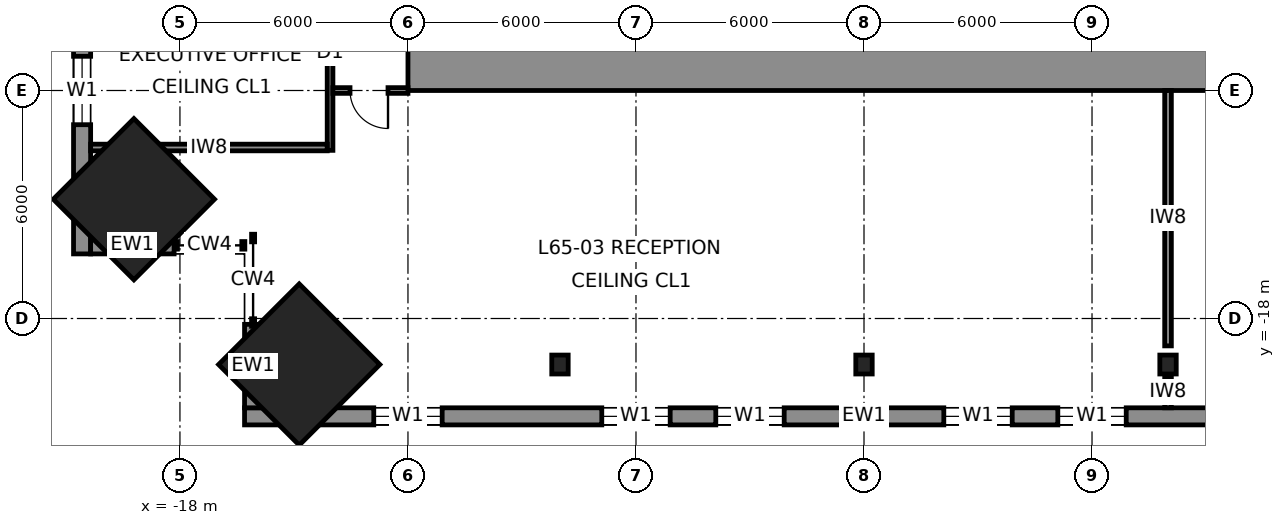
"""IFC4 building model, lengths in metres.
Left out: names, types, materials, properties, quantities, classifications, styles, units other than length and angle.
Written with IfcOpenShell. Run it as: python <this file> out.ifc"""

import sys

from ifc_helpers import new_model, si_unit, direction, frame, frame_2d, origin, origin_2d, place, context, subcontext, project, spatial, rectangle, i_section, extrude, element, fill, save


model = new_model("IFC4")
c1 = context("Model", 3, precision=1e-05, world=origin(), true_north=direction((0.0, 1.0)))
c2 = subcontext(c1, "Body", "Model", "MODEL_VIEW")
j1 = project(units=[si_unit("LENGTHUNIT", "METRE"), si_unit("PLANEANGLEUNIT", "RADIAN")], contexts=[c1])
p1 = place(None, origin())
s1 = spatial("IfcSite", under=j1, at=p1, CompositionType="ELEMENT")
p2 = place(p1, origin())
s2 = spatial("IfcBuilding", under=s1, at=p2, CompositionType="ELEMENT")
p3 = place(p2, frame((0.0, 0.0, 289.8)))
s3 = spatial("IfcBuildingStorey", under=s2, at=p3, CompositionType="ELEMENT", Elevation=289.8)
for number, where, z_axis, x_axis in (
    (1, (-14.861, -19.211, 0.0), (0.04, 0.04, 0.998), (-0.707, 0.708, 0.0)),
    (2, (-19.211, -14.861, 0.0), (0.04, 0.04, 0.998), (-0.708, 0.707, 0.0)),
):
    element("IfcColumn", number, at=place(p3, frame(where, z_axis=z_axis, x_axis=x_axis)), inside=s3, PredefinedType="COLUMN", context=c2, shape_type="SweptSolid", body=[
        extrude(rectangle(XDim=3.0, YDim=3.0, at=origin_2d()), origin(), (0.0, 0.0, 1.0), 4.007),
    ])
for number, where, z_axis, x_axis in (
    (3, (0.0, -19.211, 0.0), (0.0, 0.04, 0.999), (-1.0, 0.0, 0.0)),
    (4, (-8.0, -19.211, 0.0), (0.0, 0.04, 0.999), (-1.0, 0.0, 0.0)),
    (5, (8.0, -19.211, 0.0), (0.0, 0.04, 0.999), (-1.0, 0.0, 0.0)),
):
    element("IfcColumn", number, at=place(p3, frame(where, z_axis=z_axis, x_axis=x_axis)), inside=s3, PredefinedType="COLUMN", context=c2, shape_type="SweptSolid", body=[
        extrude(i_section(OverallWidth=0.432, OverallDepth=0.498, WebThickness=0.056, FlangeThickness=0.089, at=origin_2d()), origin(), (0.0, 0.0, 1.0), 4.003),
    ])
p4 = place(p3, frame((12.0, -11.25, 0.0), z_axis=(0.0, 0.0, 1.0), x_axis=(-1.0, 0.0, 0.0)))
e6 = element("IfcWall", 6, at=p4, inside=s3, PredefinedType="SHEAR", context=c2, shape_type="SweptSolid", body=[
    extrude(rectangle(XDim=24.0, YDim=1.5, at=frame_2d((12.0, 0.0))), origin(), (0.0, 0.0, 1.0), 4.0),
])
p5 = place(p3, frame((-16.3, -20.575, 0.0), z_axis=(0.0, 0.0, 1.0), x_axis=(1.0, 0.0, 0.0)))
e7 = element("IfcWall", 7, at=p5, inside=s3, PredefinedType="SOLIDWALL", context=c2, shape_type="SweptSolid", body=[
    extrude(rectangle(XDim=32.6, YDim=0.45, at=frame_2d((16.3, 0.0))), origin(), (0.0, 0.0, 1.0), 3.83),
])
p6 = place(p5, frame((3.4, 0.0, 0.7)))
e8 = element("IfcOpeningElement", 8, at=p6, cuts=e7, PredefinedType="OPENING", context=c2, shape_type="SweptSolid", body=[
    extrude(rectangle(XDim=1.8, YDim=2.6, at=frame_2d((0.9, 1.3))), frame((0.0, 0.235, 0.0), z_axis=(0.0, -1.0, 0.0), x_axis=(1.0, 0.0, 0.0)), (0.0, 0.0, 1.0), 0.47),
])
p7 = place(p5, frame((9.4, 0.0, 0.7)))
e9 = element("IfcOpeningElement", 9, at=p7, cuts=e7, PredefinedType="OPENING", context=c2, shape_type="SweptSolid", body=[
    extrude(rectangle(XDim=1.8, YDim=2.6, at=frame_2d((0.9, 1.3))), frame((0.0, 0.235, 0.0), z_axis=(0.0, -1.0, 0.0), x_axis=(1.0, 0.0, 0.0)), (0.0, 0.0, 1.0), 0.47),
])
p8 = place(p5, frame((12.4, 0.0, 0.7)))
e10 = element("IfcOpeningElement", 10, at=p8, cuts=e7, PredefinedType="OPENING", context=c2, shape_type="SweptSolid", body=[
    extrude(rectangle(XDim=1.8, YDim=2.6, at=frame_2d((0.9, 1.3))), frame((0.0, 0.235, 0.0), z_axis=(0.0, -1.0, 0.0), x_axis=(1.0, 0.0, 0.0)), (0.0, 0.0, 1.0), 0.47),
])
p9 = place(p5, frame((18.4, 0.0, 0.7)))
e11 = element("IfcOpeningElement", 11, at=p9, cuts=e7, PredefinedType="OPENING", context=c2, shape_type="SweptSolid", body=[
    extrude(rectangle(XDim=1.8, YDim=2.6, at=frame_2d((0.9, 1.3))), frame((0.0, 0.235, 0.0), z_axis=(0.0, -1.0, 0.0), x_axis=(1.0, 0.0, 0.0)), (0.0, 0.0, 1.0), 0.47),
])
p10 = place(p5, frame((21.4, 0.0, 0.7)))
e12 = element("IfcOpeningElement", 12, at=p10, cuts=e7, PredefinedType="OPENING", context=c2, shape_type="SweptSolid", body=[
    extrude(rectangle(XDim=1.8, YDim=2.6, at=frame_2d((0.9, 1.3))), frame((0.0, 0.235, 0.0), z_axis=(0.0, -1.0, 0.0), x_axis=(1.0, 0.0, 0.0)), (0.0, 0.0, 1.0), 0.47),
])
p11 = place(p5, frame((27.4, 0.0, 0.7)))
e13 = element("IfcOpeningElement", 13, at=p11, cuts=e7, PredefinedType="OPENING", context=c2, shape_type="SweptSolid", body=[
    extrude(rectangle(XDim=1.8, YDim=2.6, at=frame_2d((0.9, 1.3))), frame((0.0, 0.235, 0.0), z_axis=(0.0, -1.0, 0.0), x_axis=(1.0, 0.0, 0.0)), (0.0, 0.0, 1.0), 0.47),
])
p12 = place(p3, frame((-20.575, 16.3, 0.0), z_axis=(0.0, 0.0, 1.0), x_axis=(0.0, -1.0, 0.0)))
e14 = element("IfcWall", 14, at=p12, inside=s3, PredefinedType="SOLIDWALL", context=c2, shape_type="SweptSolid", body=[
    extrude(rectangle(XDim=32.6, YDim=0.45, at=frame_2d((16.3, 0.0))), origin(), (0.0, 0.0, 1.0), 3.83),
])
p13 = place(p12, frame((3.4, 0.0, 0.7)))
e15 = element("IfcOpeningElement", 15, at=p13, cuts=e14, PredefinedType="OPENING", context=c2, shape_type="SweptSolid", body=[
    extrude(rectangle(XDim=1.8, YDim=2.6, at=frame_2d((0.9, 1.3))), frame((0.0, 0.235, 0.0), z_axis=(0.0, -1.0, 0.0), x_axis=(1.0, 0.0, 0.0)), (0.0, 0.0, 1.0), 0.47),
])
p14 = place(p12, frame((9.4, 0.0, 0.7)))
e16 = element("IfcOpeningElement", 16, at=p14, cuts=e14, PredefinedType="OPENING", context=c2, shape_type="SweptSolid", body=[
    extrude(rectangle(XDim=1.8, YDim=2.6, at=frame_2d((0.9, 1.3))), frame((0.0, 0.235, 0.0), z_axis=(0.0, -1.0, 0.0), x_axis=(1.0, 0.0, 0.0)), (0.0, 0.0, 1.0), 0.47),
])
p15 = place(p12, frame((12.4, 0.0, 0.7)))
e17 = element("IfcOpeningElement", 17, at=p15, cuts=e14, PredefinedType="OPENING", context=c2, shape_type="SweptSolid", body=[
    extrude(rectangle(XDim=1.8, YDim=2.6, at=frame_2d((0.9, 1.3))), frame((0.0, 0.235, 0.0), z_axis=(0.0, -1.0, 0.0), x_axis=(1.0, 0.0, 0.0)), (0.0, 0.0, 1.0), 0.47),
])
p16 = place(p12, frame((18.4, 0.0, 0.7)))
e18 = element("IfcOpeningElement", 18, at=p16, cuts=e14, PredefinedType="OPENING", context=c2, shape_type="SweptSolid", body=[
    extrude(rectangle(XDim=1.8, YDim=2.6, at=frame_2d((0.9, 1.3))), frame((0.0, 0.235, 0.0), z_axis=(0.0, -1.0, 0.0), x_axis=(1.0, 0.0, 0.0)), (0.0, 0.0, 1.0), 0.47),
])
p17 = place(p12, frame((21.4, 0.0, 0.7)))
e19 = element("IfcOpeningElement", 19, at=p17, cuts=e14, PredefinedType="OPENING", context=c2, shape_type="SweptSolid", body=[
    extrude(rectangle(XDim=1.8, YDim=2.6, at=frame_2d((0.9, 1.3))), frame((0.0, 0.235, 0.0), z_axis=(0.0, -1.0, 0.0), x_axis=(1.0, 0.0, 0.0)), (0.0, 0.0, 1.0), 0.47),
])
p18 = place(p12, frame((27.4, 0.0, 0.7)))
e20 = element("IfcOpeningElement", 20, at=p18, cuts=e14, PredefinedType="OPENING", context=c2, shape_type="SweptSolid", body=[
    extrude(rectangle(XDim=1.8, YDim=2.6, at=frame_2d((0.9, 1.3))), frame((0.0, 0.235, 0.0), z_axis=(0.0, -1.0, 0.0), x_axis=(1.0, 0.0, 0.0)), (0.0, 0.0, 1.0), 0.47),
])
for number, where, z_axis, x_axis in (
    (21, (-16.075, -18.154, 0.0), (0.0, 0.0, 1.0), (0.0, -1.0, 0.0)),
    (22, (-18.154, -16.075, 0.0), (0.0, 0.0, 1.0), (-1.0, 0.0, 0.0)),
):
    element("IfcWall", number, at=place(p3, frame(where, z_axis=z_axis, x_axis=x_axis)), inside=s3, PredefinedType="SOLIDWALL", context=c2, shape_type="SweptSolid", body=[
        extrude(rectangle(XDim=2.197, YDim=0.45, at=frame_2d((1.098, 0.0))), origin(), (0.0, 0.0, 1.0), 3.83),
    ])
p19 = place(p3, frame((-14.05, 13.575, 0.0), z_axis=(0.0, 0.0, 1.0), x_axis=(0.0, -1.0, 0.0)))
e23 = element("IfcWall", 23, at=p19, inside=s3, PredefinedType="PARTITIONING", context=c2, shape_type="SweptSolid", body=[
    extrude(rectangle(XDim=27.15, YDim=0.15, at=frame_2d((13.575, 0.0))), origin(), (0.0, 0.0, 1.0), 3.83),
])
p20 = place(p19, frame((22.975, 0.0, 0.0)))
e24 = element("IfcOpeningElement", 24, at=p20, cuts=e23, PredefinedType="OPENING", context=c2, shape_type="SweptSolid", body=[
    extrude(rectangle(XDim=1.0, YDim=2.3, at=frame_2d((0.5, 1.15))), frame((0.0, 0.085, 0.0), z_axis=(0.0, -1.0, 0.0), x_axis=(1.0, 0.0, 0.0)), (0.0, 0.0, 1.0), 0.17),
])
p21 = place(p19, frame((19.525, 0.0, 0.0)))
e25 = element("IfcOpeningElement", 25, at=p21, cuts=e23, PredefinedType="OPENING", context=c2, shape_type="SweptSolid", body=[
    extrude(rectangle(XDim=1.0, YDim=2.3, at=frame_2d((0.5, 1.15))), frame((0.0, 0.085, 0.0), z_axis=(0.0, -1.0, 0.0), x_axis=(1.0, 0.0, 0.0)), (0.0, 0.0, 1.0), 0.17),
])
p22 = place(p19, frame((8.875, 0.0, 0.0)))
e26 = element("IfcOpeningElement", 26, at=p22, cuts=e23, PredefinedType="OPENING", context=c2, shape_type="SweptSolid", body=[
    extrude(rectangle(XDim=1.4, YDim=2.3, at=frame_2d((0.7, 1.15))), frame((0.0, 0.085, 0.0), z_axis=(0.0, -1.0, 0.0), x_axis=(1.0, 0.0, 0.0)), (0.0, 0.0, 1.0), 0.17),
])
p23 = place(p19, frame((3.175, 0.0, 0.0)))
e27 = element("IfcOpeningElement", 27, at=p23, cuts=e23, PredefinedType="OPENING", context=c2, shape_type="SweptSolid", body=[
    extrude(rectangle(XDim=1.0, YDim=2.3, at=frame_2d((0.5, 1.15))), frame((0.0, 0.085, 0.0), z_axis=(0.0, -1.0, 0.0), x_axis=(1.0, 0.0, 0.0)), (0.0, 0.0, 1.0), 0.17),
])
p24 = place(p19, frame((16.575, 0.0, 0.0)))
e28 = element("IfcOpeningElement", 28, at=p24, cuts=e23, PredefinedType="OPENING", context=c2, shape_type="SweptSolid", body=[
    extrude(rectangle(XDim=1.0, YDim=2.3, at=frame_2d((0.5, 1.15))), frame((0.0, 0.085, 0.0), z_axis=(0.0, -1.0, 0.0), x_axis=(1.0, 0.0, 0.0)), (0.0, 0.0, 1.0), 0.17),
])
p25 = place(p3, frame((-12.0, -12.0, 0.0), z_axis=(0.0, 0.0, 1.0), x_axis=(-1.0, 0.0, 0.0)))
e29 = element("IfcWall", 29, at=p25, inside=s3, PredefinedType="PARTITIONING", context=c2, shape_type="SweptSolid", body=[
    extrude(rectangle(XDim=1.975, YDim=0.15, at=frame_2d((0.988, 0.0))), origin(), (0.0, 0.0, 1.0), 3.83),
])
p26 = place(p25, frame((0.525, 0.0, 0.0)))
e30 = element("IfcOpeningElement", 30, at=p26, cuts=e29, PredefinedType="OPENING", context=c2, shape_type="SweptSolid", body=[
    extrude(rectangle(XDim=1.0, YDim=2.3, at=frame_2d((0.5, 1.15))), frame((0.0, 0.085, 0.0), z_axis=(0.0, -1.0, 0.0), x_axis=(1.0, 0.0, 0.0)), (0.0, 0.0, 1.0), 0.17),
])
p27 = place(p3, frame((-14.125, -13.5, 0.0), z_axis=(0.0, 0.0, 1.0), x_axis=(-1.0, 0.0, 0.0)))
e31 = element("IfcWall", 31, at=p27, inside=s3, PredefinedType="PARTITIONING", context=c2, shape_type="SweptSolid", body=[
    extrude(rectangle(XDim=6.225, YDim=0.175, at=frame_2d((3.113, 0.0))), origin(), (0.0, 0.0, 1.0), 3.83),
])
p28 = place(p3, frame((8.0, -12.0, 0.0), z_axis=(0.0, 0.0, 1.0), x_axis=(0.0, -1.0, 0.0)))
e32 = element("IfcWall", 32, at=p28, inside=s3, PredefinedType="PARTITIONING", context=c2, shape_type="SweptSolid", body=[
    extrude(rectangle(XDim=6.72, YDim=0.175, at=frame_2d((3.36, 0.0))), origin(), (0.0, 0.0, 1.0), 3.016),
])
p29 = place(p3, frame((8.0, -19.541, 0.0), z_axis=(0.0, 0.0, 1.0), x_axis=(0.0, -1.0, 0.0)))
e33 = element("IfcWall", 33, at=p29, inside=s3, PredefinedType="PARTITIONING", context=c2, shape_type="SweptSolid", body=[
    extrude(rectangle(XDim=0.809, YDim=0.175, at=frame_2d((0.405, 0.0))), origin(), (0.0, 0.0, 1.0), 3.83),
])
p30 = place(p6, origin())
e34 = element("IfcWindow", 34, at=p30, inside=s3, PartitioningType="SINGLE_PANEL", PredefinedType="WINDOW", context=c2, shape_type="SweptSolid", body=[
    extrude(rectangle(XDim=1.8, YDim=2.6, at=frame_2d((0.9, 1.3))), frame((0.0, 0.03, 0.0), z_axis=(0.0, -1.0, 0.0), x_axis=(1.0, 0.0, 0.0)), (0.0, 0.0, 1.0), 0.06),
])
fill(e8, e34)
p31 = place(p7, origin())
e35 = element("IfcWindow", 35, at=p31, inside=s3, PartitioningType="SINGLE_PANEL", PredefinedType="WINDOW", context=c2, shape_type="SweptSolid", body=[
    extrude(rectangle(XDim=1.8, YDim=2.6, at=frame_2d((0.9, 1.3))), frame((0.0, 0.03, 0.0), z_axis=(0.0, -1.0, 0.0), x_axis=(1.0, 0.0, 0.0)), (0.0, 0.0, 1.0), 0.06),
])
fill(e9, e35)
p32 = place(p8, origin())
e36 = element("IfcWindow", 36, at=p32, inside=s3, PartitioningType="SINGLE_PANEL", PredefinedType="WINDOW", context=c2, shape_type="SweptSolid", body=[
    extrude(rectangle(XDim=1.8, YDim=2.6, at=frame_2d((0.9, 1.3))), frame((0.0, 0.03, 0.0), z_axis=(0.0, -1.0, 0.0), x_axis=(1.0, 0.0, 0.0)), (0.0, 0.0, 1.0), 0.06),
])
fill(e10, e36)
p33 = place(p9, origin())
e37 = element("IfcWindow", 37, at=p33, inside=s3, PartitioningType="SINGLE_PANEL", PredefinedType="WINDOW", context=c2, shape_type="SweptSolid", body=[
    extrude(rectangle(XDim=1.8, YDim=2.6, at=frame_2d((0.9, 1.3))), frame((0.0, 0.03, 0.0), z_axis=(0.0, -1.0, 0.0), x_axis=(1.0, 0.0, 0.0)), (0.0, 0.0, 1.0), 0.06),
])
fill(e11, e37)
p34 = place(p10, origin())
e38 = element("IfcWindow", 38, at=p34, inside=s3, PartitioningType="SINGLE_PANEL", PredefinedType="WINDOW", context=c2, shape_type="SweptSolid", body=[
    extrude(rectangle(XDim=1.8, YDim=2.6, at=frame_2d((0.9, 1.3))), frame((0.0, 0.03, 0.0), z_axis=(0.0, -1.0, 0.0), x_axis=(1.0, 0.0, 0.0)), (0.0, 0.0, 1.0), 0.06),
])
fill(e12, e38)
p35 = place(p18, origin())
e39 = element("IfcWindow", 39, at=p35, inside=s3, PartitioningType="SINGLE_PANEL", PredefinedType="WINDOW", context=c2, shape_type="SweptSolid", body=[
    extrude(rectangle(XDim=1.8, YDim=2.6, at=frame_2d((0.9, 1.3))), frame((0.0, 0.03, 0.0), z_axis=(0.0, -1.0, 0.0), x_axis=(1.0, 0.0, 0.0)), (0.0, 0.0, 1.0), 0.06),
])
fill(e20, e39)
p36 = place(p26, origin())
e40 = element("IfcDoor", 40, at=p36, inside=s3, OperationType="SINGLE_SWING_LEFT", PredefinedType="DOOR", context=c2, shape_type="SweptSolid", body=[
    extrude(rectangle(XDim=1.0, YDim=2.3, at=frame_2d((0.5, 1.15))), frame((0.0, 0.025, 0.0), z_axis=(0.0, -1.0, 0.0), x_axis=(1.0, 0.0, 0.0)), (0.0, 0.0, 1.0), 0.05),
])
fill(e30, e40)
save(model, sys.argv[1])
